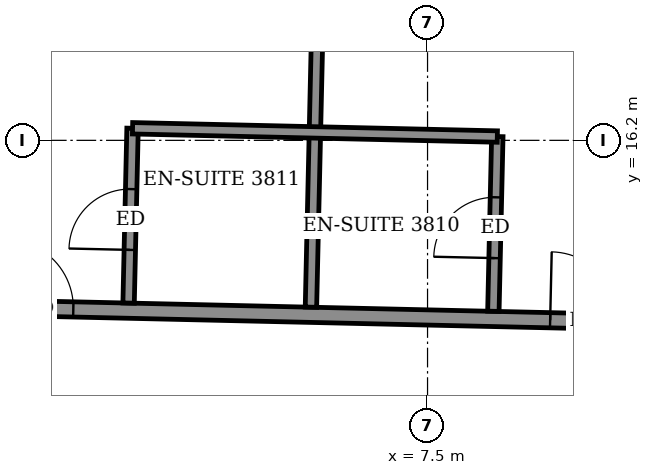
"""IFC4 building model, lengths in metres.
Left out: names, types, materials, properties, quantities, classifications, styles, units other than length and angle.
Written with IfcOpenShell. Run it as: python <this file> out.ifc"""

import sys

from ifc_helpers import new_model, si_unit, direction, frame, frame_2d, origin, place, context, subcontext, project, spatial, rectangle, extrude, element, fill, save


model = new_model("IFC4")
c1 = context("Model", 3, precision=1e-05, world=origin(), true_north=direction((0.0, 1.0)))
c2 = subcontext(c1, "Body", "Model", "MODEL_VIEW")
j1 = project(units=[si_unit("LENGTHUNIT", "METRE"), si_unit("PLANEANGLEUNIT", "RADIAN")], contexts=[c1])
p1 = place(None, origin())
s1 = spatial("IfcSite", under=j1, at=p1, CompositionType="ELEMENT")
p2 = place(p1, origin())
s2 = spatial("IfcBuilding", under=s1, at=p2, CompositionType="ELEMENT")
p3 = place(p2, frame((0.0, 0.0, 152.7)))
s3 = spatial("IfcBuildingStorey", under=s2, at=p3, CompositionType="ELEMENT", Elevation=152.7)
p4 = place(p3, frame((-21.279, 14.523, 0.0), z_axis=(0.0, 0.0, 1.0), x_axis=(0.999742669174, -0.02268469602, 0.0)))
e1 = element("IfcWall", 1, at=p4, inside=s3, PredefinedType="PARTITIONING", context=c2, shape_type="SweptSolid", body=[
    extrude(rectangle(XDim=40.639, YDim=0.2, at=frame_2d((20.319, 0.0))), origin(), (0.0, 0.0, 1.0), 3.05),
])
p5 = place(p4, frame((37.65, 0.0, 0.0)))
e2 = element("IfcOpeningElement", 2, at=p5, cuts=e1, PredefinedType="OPENING", context=c2, shape_type="SweptSolid", body=[
    extrude(rectangle(XDim=0.9, YDim=2.1, at=frame_2d((0.45, 1.05))), frame((0.0, 0.11, 0.0), z_axis=(0.0, -1.0, 0.0), x_axis=(1.0, 0.0, 0.0)), (0.0, 0.0, 1.0), 0.22),
])
p6 = place(p4, frame((32.775, 0.0, 0.0)))
e3 = element("IfcOpeningElement", 3, at=p6, cuts=e1, PredefinedType="OPENING", context=c2, shape_type="SweptSolid", body=[
    extrude(rectangle(XDim=0.9, YDim=2.1, at=frame_2d((0.45, 1.05))), frame((0.0, 0.11, 0.0), z_axis=(0.0, -1.0, 0.0), x_axis=(1.0, 0.0, 0.0)), (0.0, 0.0, 1.0), 0.22),
])
p7 = place(p4, frame((30.4, 0.0, 0.0)))
e4 = element("IfcOpeningElement", 4, at=p7, cuts=e1, PredefinedType="OPENING", context=c2, shape_type="SweptSolid", body=[
    extrude(rectangle(XDim=0.9, YDim=2.1, at=frame_2d((0.45, 1.05))), frame((0.0, 0.11, 0.0), z_axis=(0.0, -1.0, 0.0), x_axis=(1.0, 0.0, 0.0)), (0.0, 0.0, 1.0), 0.22),
])
p8 = place(p4, frame((23.225, 0.0, 0.0)))
e5 = element("IfcOpeningElement", 5, at=p8, cuts=e1, PredefinedType="OPENING", context=c2, shape_type="SweptSolid", body=[
    extrude(rectangle(XDim=0.9, YDim=2.1, at=frame_2d((0.45, 1.05))), frame((0.0, 0.11, 0.0), z_axis=(0.0, -1.0, 0.0), x_axis=(1.0, 0.0, 0.0)), (0.0, 0.0, 1.0), 0.22),
])
p9 = place(p4, frame((20.85, 0.0, 0.0)))
e6 = element("IfcOpeningElement", 6, at=p9, cuts=e1, PredefinedType="OPENING", context=c2, shape_type="SweptSolid", body=[
    extrude(rectangle(XDim=0.9, YDim=2.1, at=frame_2d((0.45, 1.05))), frame((0.0, 0.11, 0.0), z_axis=(0.0, -1.0, 0.0), x_axis=(1.0, 0.0, 0.0)), (0.0, 0.0, 1.0), 0.22),
])
p10 = place(p4, frame((13.675, 0.0, 0.0)))
e7 = element("IfcOpeningElement", 7, at=p10, cuts=e1, PredefinedType="OPENING", context=c2, shape_type="SweptSolid", body=[
    extrude(rectangle(XDim=0.9, YDim=2.1, at=frame_2d((0.45, 1.05))), frame((0.0, 0.11, 0.0), z_axis=(0.0, -1.0, 0.0), x_axis=(1.0, 0.0, 0.0)), (0.0, 0.0, 1.0), 0.22),
])
p11 = place(p4, frame((11.325, 0.0, 0.0)))
e8 = element("IfcOpeningElement", 8, at=p11, cuts=e1, PredefinedType="OPENING", context=c2, shape_type="SweptSolid", body=[
    extrude(rectangle(XDim=0.9, YDim=2.1, at=frame_2d((0.45, 1.05))), frame((0.0, 0.11, 0.0), z_axis=(0.0, -1.0, 0.0), x_axis=(1.0, 0.0, 0.0)), (0.0, 0.0, 1.0), 0.22),
])
p12 = place(p4, frame((1.6, 0.0, 0.0)))
e9 = element("IfcOpeningElement", 9, at=p12, cuts=e1, PredefinedType="OPENING", context=c2, shape_type="SweptSolid", body=[
    extrude(rectangle(XDim=1.0, YDim=2.1, at=frame_2d((0.5, 1.05))), frame((0.0, 0.11, 0.0), z_axis=(0.0, -1.0, 0.0), x_axis=(1.0, 0.0, 0.0)), (0.0, 0.0, 1.0), 0.22),
])
p13 = place(p4, frame((6.55, 0.0, 0.0)))
e10 = element("IfcOpeningElement", 10, at=p13, cuts=e1, PredefinedType="OPENING", context=c2, shape_type="SweptSolid", body=[
    extrude(rectangle(XDim=0.9, YDim=2.1, at=frame_2d((0.45, 1.05))), frame((0.0, 0.11, 0.0), z_axis=(0.0, -1.0, 0.0), x_axis=(1.0, 0.0, 0.0)), (0.0, 0.0, 1.0), 0.22),
])
p14 = place(p3, frame((3.567, 14.059, 0.0), z_axis=(0.0, 0.0, 1.0), x_axis=(0.022605686808, 0.999744458811, 0.0)))
e11 = element("IfcWall", 11, at=p14, inside=s3, PredefinedType="PARTITIONING", context=c2, shape_type="SweptSolid", body=[
    extrude(rectangle(XDim=2.3, YDim=0.15, at=frame_2d((1.15, 0.0))), origin(), (0.0, 0.0, 1.0), 3.05),
])
p15 = place(p14, frame((0.7, 0.0, 0.0)))
e12 = element("IfcOpeningElement", 12, at=p15, cuts=e11, PredefinedType="OPENING", context=c2, shape_type="SweptSolid", body=[
    extrude(rectangle(XDim=0.8, YDim=2.1, at=frame_2d((0.4, 1.05))), frame((0.0, 0.085, 0.0), z_axis=(0.0, -1.0, 0.0), x_axis=(1.0, 0.0, 0.0)), (0.0, 0.0, 1.0), 0.17),
])
p16 = place(p3, frame((5.966, 14.005, 0.0), z_axis=(0.0, 0.0, 1.0), x_axis=(0.022687855237, 0.999742597484, 0.0)))
e13 = element("IfcWall", 13, at=p16, inside=s3, PredefinedType="PARTITIONING", context=c2, shape_type="SweptSolid", body=[
    extrude(rectangle(XDim=5.951, YDim=0.15, at=frame_2d((2.975, 0.0))), origin(), (0.0, 0.0, 1.0), 2.55),
])
p17 = place(p3, frame((8.366, 13.951, 0.0), z_axis=(0.0, 0.0, 1.0), x_axis=(0.022612884682, 0.999744296031, 0.0)))
e14 = element("IfcWall", 14, at=p17, inside=s3, PredefinedType="PARTITIONING", context=c2, shape_type="SweptSolid", body=[
    extrude(rectangle(XDim=2.3, YDim=0.15, at=frame_2d((1.15, 0.0))), origin(), (0.0, 0.0, 1.0), 3.05),
])
p18 = place(p17, frame((0.7, 0.0, 0.0)))
e15 = element("IfcOpeningElement", 15, at=p18, cuts=e14, PredefinedType="OPENING", context=c2, shape_type="SweptSolid", body=[
    extrude(rectangle(XDim=0.8, YDim=2.1, at=frame_2d((0.4, 1.05))), frame((0.0, 0.085, 0.0), z_axis=(0.0, -1.0, 0.0), x_axis=(1.0, 0.0, 0.0)), (0.0, 0.0, 1.0), 0.17),
])
p19 = place(p3, frame((3.619, 16.359, 0.0), z_axis=(0.0, 0.0, 1.0), x_axis=(0.999742701292, -0.022683280499, 0.0)))
e16 = element("IfcWall", 16, at=p19, inside=s3, PredefinedType="PARTITIONING", context=c2, shape_type="SweptSolid", body=[
    extrude(rectangle(XDim=4.8, YDim=0.15, at=frame_2d((2.4, 0.0))), origin(), (0.0, 0.0, 1.0), 3.05),
])
p20 = place(p7, origin())
e17 = element("IfcDoor", 17, at=p20, inside=s3, OperationType="SINGLE_SWING_RIGHT", PredefinedType="DOOR", context=c2, shape_type="SweptSolid", body=[
    extrude(rectangle(XDim=0.9, YDim=2.1, at=frame_2d((0.45, 1.05))), frame((0.0, 0.025, 0.0), z_axis=(0.0, -1.0, 0.0), x_axis=(1.0, 0.0, 0.0)), (0.0, 0.0, 1.0), 0.05),
])
fill(e4, e17)
p21 = place(p18, origin())
e18 = element("IfcDoor", 18, at=p21, inside=s3, OperationType="SINGLE_SWING_RIGHT", PredefinedType="DOOR", context=c2, shape_type="SweptSolid", body=[
    extrude(rectangle(XDim=0.8, YDim=2.1, at=frame_2d((0.4, 1.05))), frame((0.0, 0.025, 0.0), z_axis=(0.0, -1.0, 0.0), x_axis=(1.0, 0.0, 0.0)), (0.0, 0.0, 1.0), 0.05),
])
fill(e15, e18)
p22 = place(p8, origin())
e19 = element("IfcDoor", 19, at=p22, inside=s3, OperationType="SINGLE_SWING_LEFT", PredefinedType="DOOR", context=c2, shape_type="SweptSolid", body=[
    extrude(rectangle(XDim=0.9, YDim=2.1, at=frame_2d((0.45, 1.05))), frame((0.0, 0.025, 0.0), z_axis=(0.0, -1.0, 0.0), x_axis=(1.0, 0.0, 0.0)), (0.0, 0.0, 1.0), 0.05),
])
fill(e5, e19)
p23 = place(p15, origin())
e20 = element("IfcDoor", 20, at=p23, inside=s3, OperationType="SINGLE_SWING_LEFT", PredefinedType="DOOR", context=c2, shape_type="SweptSolid", body=[
    extrude(rectangle(XDim=0.8, YDim=2.1, at=frame_2d((0.4, 1.05))), frame((0.0, 0.025, 0.0), z_axis=(0.0, -1.0, 0.0), x_axis=(1.0, 0.0, 0.0)), (0.0, 0.0, 1.0), 0.05),
])
fill(e12, e20)
save(model, sys.argv[1])
